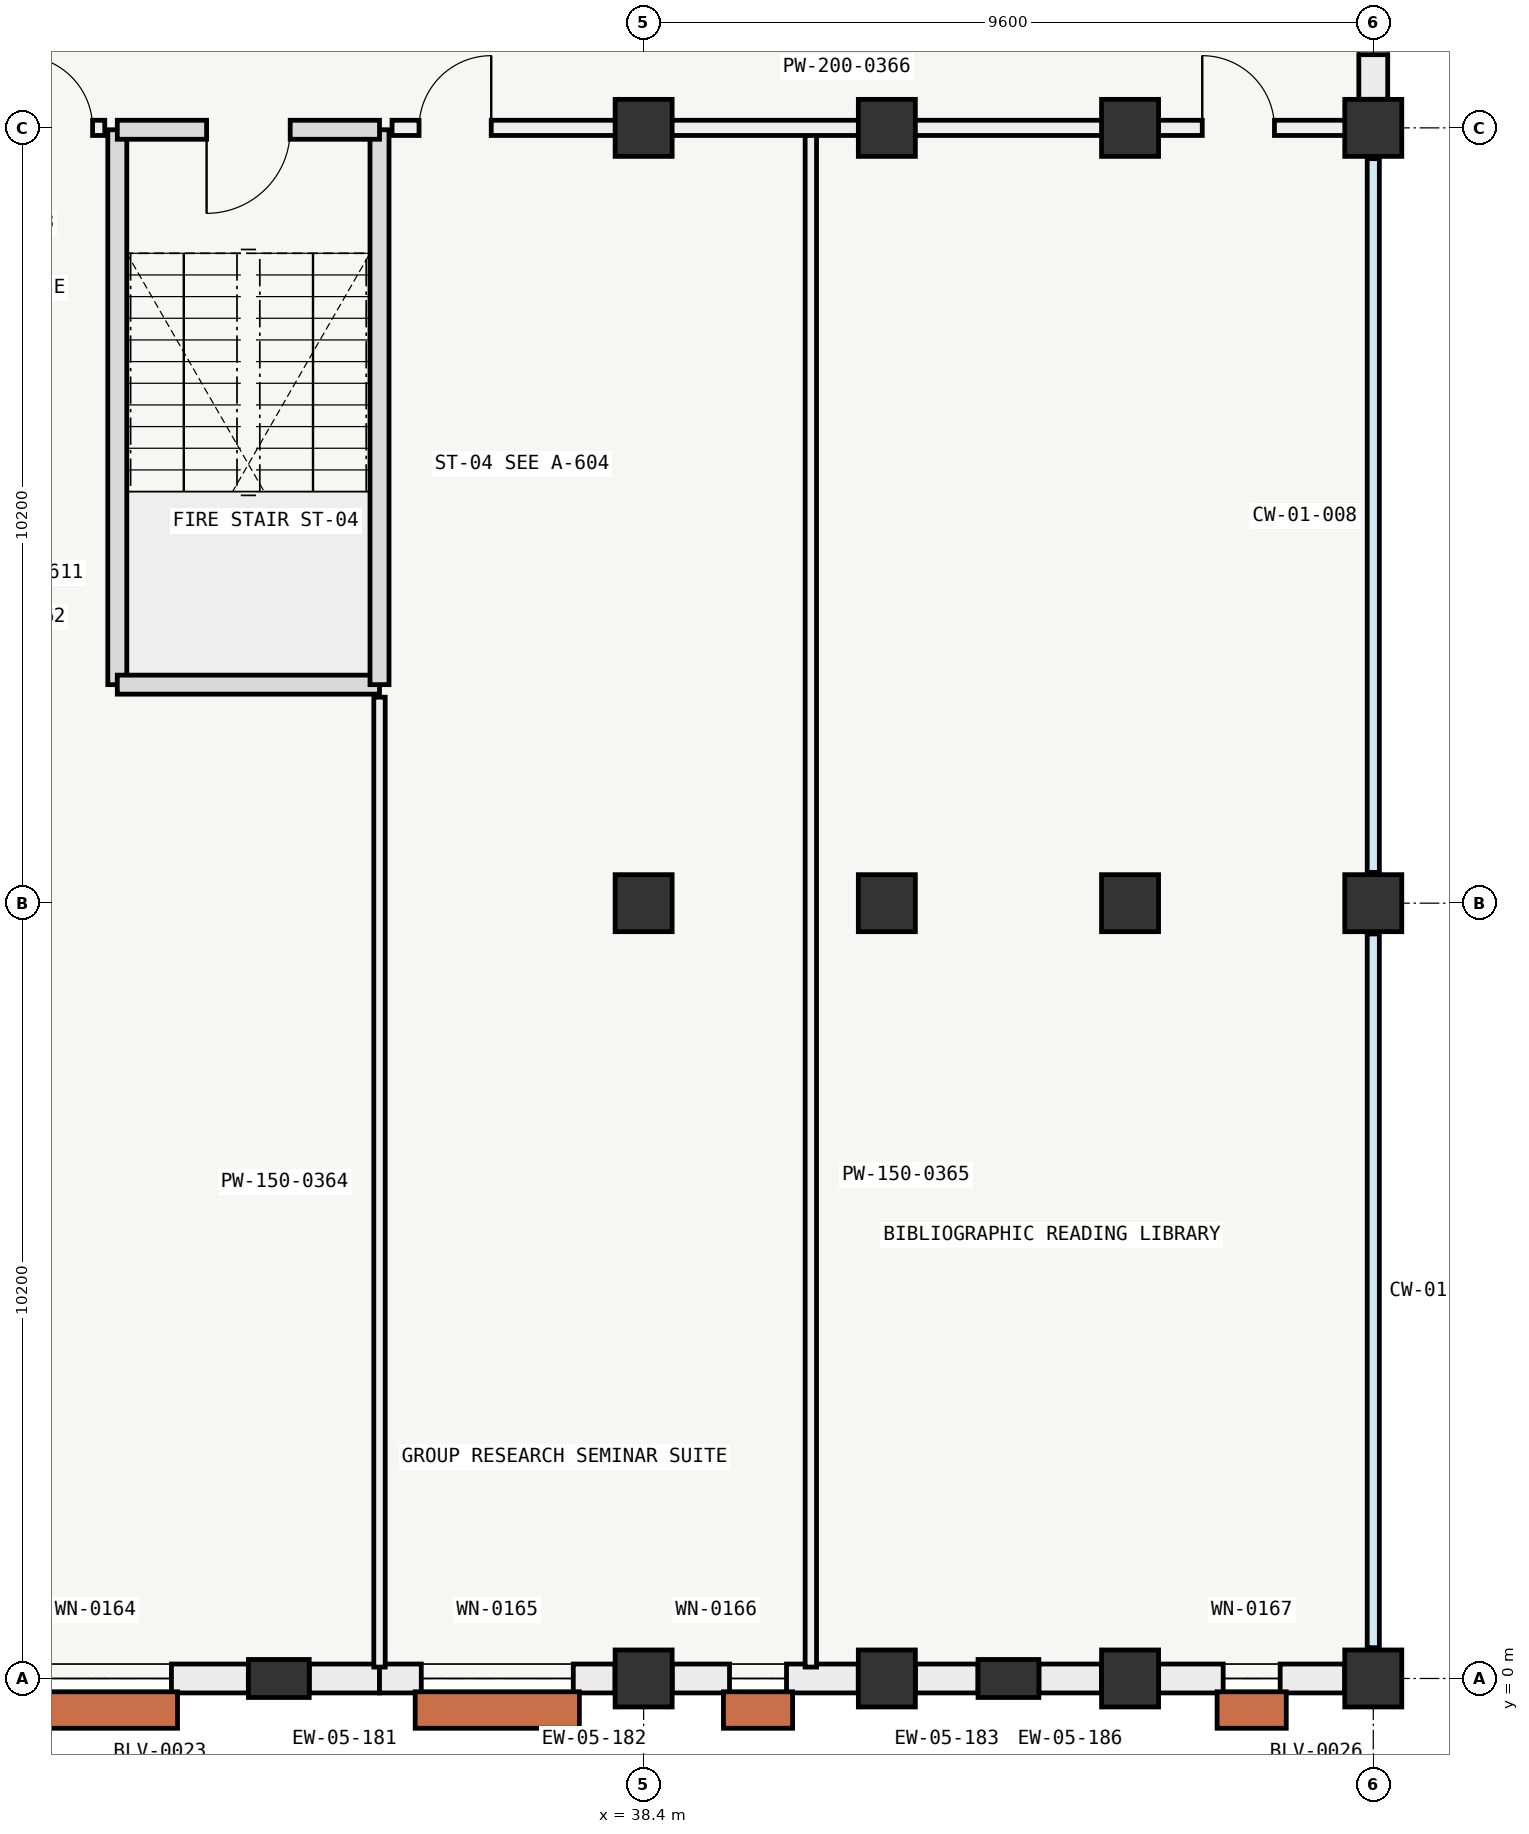
"""IFC4 building model, lengths in metres.
Left out: names, types, materials, properties, quantities, classifications, styles, units other than length and angle.
Written with IfcOpenShell. Run it as: python <this file> out.ifc"""

import sys

from ifc_helpers import new_model, si_unit, direction, frame, frame_2d, origin, origin_2d, place, context, subcontext, project, spatial, rectangle, extrude, element, fill, save


model = new_model("IFC4")
c1 = context("Model", 3, precision=1e-05, world=origin(), true_north=direction((0.0, 1.0)))
c2 = subcontext(c1, "Body", "Model", "MODEL_VIEW")
j1 = project(units=[si_unit("LENGTHUNIT", "METRE"), si_unit("PLANEANGLEUNIT", "RADIAN")], contexts=[c1])
p1 = place(None, origin())
s1 = spatial("IfcSite", under=j1, at=p1, CompositionType="ELEMENT")
p2 = place(p1, origin())
s2 = spatial("IfcBuilding", under=s1, at=p2, CompositionType="ELEMENT")
p3 = place(p2, frame((0.0, 0.0, 5.4)))
s3 = spatial("IfcBuildingStorey", under=s2, at=p3, CompositionType="ELEMENT", Elevation=5.4)
for number, where, z_axis, x_axis in (
    (1, (38.4, 0.0, 0.0), (0.0, 0.0, 1.0), (1.0, 0.0, 0.0)),
    (2, (38.4, 10.2, 0.0), (0.0, 0.0, 1.0), (1.0, 0.0, 0.0)),
    (3, (38.4, 20.4, 0.0), (0.0, 0.0, 1.0), (1.0, 0.0, 0.0)),
    (4, (41.6, 0.0, 0.0), (0.0, 0.0, 1.0), (1.0, 0.0, 0.0)),
    (5, (41.6, 10.2, 0.0), (0.0, 0.0, 1.0), (1.0, 0.0, 0.0)),
    (6, (41.6, 20.4, 0.0), (0.0, 0.0, 1.0), (1.0, 0.0, 0.0)),
    (7, (44.8, 0.0, 0.0), (0.0, 0.0, 1.0), (1.0, 0.0, 0.0)),
    (8, (44.8, 10.2, 0.0), (0.0, 0.0, 1.0), (1.0, 0.0, 0.0)),
    (9, (44.8, 20.4, 0.0), (0.0, 0.0, 1.0), (1.0, 0.0, 0.0)),
    (10, (48.0, 0.0, 0.0), (0.0, 0.0, 1.0), (1.0, 0.0, 0.0)),
    (11, (48.0, 10.2, 0.0), (0.0, 0.0, 1.0), (1.0, 0.0, 0.0)),
    (12, (48.0, 20.4, 0.0), (0.0, 0.0, 1.0), (1.0, 0.0, 0.0)),
):
    element("IfcColumn", number, at=place(p3, frame(where, z_axis=z_axis, x_axis=x_axis)), inside=s3, PredefinedType="COLUMN", context=c2, shape_type="SweptSolid", body=[
        extrude(rectangle(XDim=0.75, YDim=0.75, at=origin_2d()), origin(), (0.0, 0.0, 1.0), 4.2),
    ])
for number, where, z_axis, x_axis in (
    (13, (33.6, 0.0, 0.0), (0.0, 0.0, 1.0), (0.0, 1.0, 0.0)),
    (14, (43.2, 0.0, 0.0), (0.0, 0.0, 1.0), (0.0, 1.0, 0.0)),
):
    element("IfcColumn", number, at=place(p3, frame(where, z_axis=z_axis, x_axis=x_axis)), inside=s3, PredefinedType="PILASTER", context=c2, shape_type="SweptSolid", body=[
        extrude(rectangle(XDim=0.5, YDim=0.8, at=origin_2d()), origin(), (0.0, 0.0, 1.0), 4.2),
    ])
p4 = place(p3, frame((33.199, 0.0, 0.0), z_axis=(0.0, 0.0, 1.0), x_axis=(-1.0, 0.0, 0.0)))
e15 = element("IfcWall", 15, at=p4, inside=s3, PredefinedType="SOLIDWALL", context=c2, shape_type="SweptSolid", body=[
    extrude(rectangle(XDim=4.023, YDim=0.38, at=frame_2d((2.011, 0.0))), origin(), (0.0, 0.0, 1.0), 3.25),
])
p5 = place(p4, frame((1.011, 0.0, 0.8)))
e16 = element("IfcOpeningElement", 16, at=p5, cuts=e15, PredefinedType="OPENING", context=c2, shape_type="SweptSolid", body=[
    extrude(rectangle(XDim=2.0, YDim=1.35, at=frame_2d((1.0, 0.675))), frame((0.0, 0.2, 0.0), z_axis=(0.0, -1.0, 0.0), x_axis=(1.0, 0.0, 0.0)), (0.0, 0.0, 1.0), 0.4),
])
p6 = place(p3, frame((34.925, 0.0, 0.0), z_axis=(0.0, 0.0, 1.0), x_axis=(-1.0, 0.0, 0.0)))
e17 = element("IfcWall", 17, at=p6, inside=s3, PredefinedType="SOLIDWALL", context=c2, shape_type="SweptSolid", body=[
    extrude(rectangle(XDim=0.924, YDim=0.38, at=frame_2d((0.462, 0.0))), origin(), (0.0, 0.0, 1.0), 3.25),
])
p7 = place(p3, frame((38.024, 0.0, 0.0), z_axis=(0.0, 0.0, 1.0), x_axis=(-1.0, 0.0, 0.0)))
e18 = element("IfcWall", 18, at=p7, inside=s3, PredefinedType="SOLIDWALL", context=c2, shape_type="SweptSolid", body=[
    extrude(rectangle(XDim=3.099, YDim=0.38, at=frame_2d((1.549, 0.0))), origin(), (0.0, 0.0, 1.0), 3.25),
])
p8 = place(p7, frame((0.55, 0.0, 0.8)))
e19 = element("IfcOpeningElement", 19, at=p8, cuts=e18, PredefinedType="OPENING", context=c2, shape_type="SweptSolid", body=[
    extrude(rectangle(XDim=2.0, YDim=1.35, at=frame_2d((1.0, 0.675))), frame((0.0, 0.2, 0.0), z_axis=(0.0, -1.0, 0.0), x_axis=(1.0, 0.0, 0.0)), (0.0, 0.0, 1.0), 0.4),
])
p9 = place(p3, frame((42.799, 0.0, 0.0), z_axis=(0.0, 0.0, 1.0), x_axis=(-1.0, 0.0, 0.0)))
e20 = element("IfcWall", 20, at=p9, inside=s3, PredefinedType="SOLIDWALL", context=c2, shape_type="SweptSolid", body=[
    extrude(rectangle(XDim=0.823, YDim=0.38, at=frame_2d((0.412, 0.0))), origin(), (0.0, 0.0, 1.0), 3.25),
])
p10 = place(p3, frame((41.224, 0.0, 0.0), z_axis=(0.0, 0.0, 1.0), x_axis=(-1.0, 0.0, 0.0)))
e21 = element("IfcWall", 21, at=p10, inside=s3, PredefinedType="SOLIDWALL", context=c2, shape_type="SweptSolid", body=[
    extrude(rectangle(XDim=2.448, YDim=0.38, at=frame_2d((1.224, 0.0))), origin(), (0.0, 0.0, 1.0), 3.25),
])
p11 = place(p10, frame((0.944, 0.0, 0.8)))
e22 = element("IfcOpeningElement", 22, at=p11, cuts=e21, PredefinedType="OPENING", context=c2, shape_type="SweptSolid", body=[
    extrude(rectangle(XDim=0.75, YDim=1.1, at=frame_2d((0.375, 0.55))), frame((0.0, 0.2, 0.0), z_axis=(0.0, -1.0, 0.0), x_axis=(1.0, 0.0, 0.0)), (0.0, 0.0, 1.0), 0.4),
])
p12 = place(p3, frame((47.624, 0.0, 0.0), z_axis=(0.0, 0.0, 1.0), x_axis=(-1.0, 0.0, 0.0)))
e23 = element("IfcWall", 23, at=p12, inside=s3, PredefinedType="SOLIDWALL", context=c2, shape_type="SweptSolid", body=[
    extrude(rectangle(XDim=2.448, YDim=0.38, at=frame_2d((1.224, 0.0))), origin(), (0.0, 0.0, 1.0), 3.25),
])
p13 = place(p12, frame((0.849, 0.0, 0.8)))
e24 = element("IfcOpeningElement", 24, at=p13, cuts=e23, PredefinedType="OPENING", context=c2, shape_type="SweptSolid", body=[
    extrude(rectangle(XDim=0.75, YDim=1.1, at=frame_2d((0.375, 0.55))), frame((0.0, 0.2, 0.0), z_axis=(0.0, -1.0, 0.0), x_axis=(1.0, 0.0, 0.0)), (0.0, 0.0, 1.0), 0.4),
])
p14 = place(p3, frame((44.424, 0.0, 0.0), z_axis=(0.0, 0.0, 1.0), x_axis=(-1.0, 0.0, 0.0)))
e25 = element("IfcWall", 25, at=p14, inside=s3, PredefinedType="SOLIDWALL", context=c2, shape_type="SweptSolid", body=[
    extrude(rectangle(XDim=0.823, YDim=0.38, at=frame_2d((0.412, 0.0))), origin(), (0.0, 0.0, 1.0), 3.25),
])
p15 = place(p3, frame((48.0, 23.95, 0.0), z_axis=(0.0, 0.0, 1.0), x_axis=(0.0, -1.0, 0.0)))
e26 = element("IfcWall", 26, at=p15, inside=s3, PredefinedType="SOLIDWALL", context=c2, shape_type="SweptSolid", body=[
    extrude(rectangle(XDim=3.174, YDim=0.38, at=frame_2d((1.587, 0.0))), origin(), (0.0, 0.0, 1.0), 3.25),
])
p16 = place(p15, frame((0.587, 0.0, 0.75)))
e27 = element("IfcOpeningElement", 27, at=p16, cuts=e26, PredefinedType="OPENING", context=c2, shape_type="SweptSolid", body=[
    extrude(rectangle(XDim=2.0, YDim=1.35, at=frame_2d((1.0, 0.675))), frame((0.0, 0.2, 0.0), z_axis=(0.0, -1.0, 0.0), x_axis=(1.0, 0.0, 0.0)), (0.0, 0.0, 1.0), 0.4),
])
p17 = place(p3, frame((31.475, 20.375, 0.0), z_axis=(0.0, 0.0, 1.0), x_axis=(0.0, -1.0, 0.0)))
e28 = element("IfcWall", 28, at=p17, inside=s3, PredefinedType="SOLIDWALL", context=c2, shape_type="SweptSolid", body=[
    extrude(rectangle(XDim=7.3, YDim=0.25, at=frame_2d((3.65, 0.0))), origin(), (0.0, 0.0, 1.0), 3.92),
])
p18 = place(p3, frame((31.475, 13.075, 0.0), z_axis=(0.0, 0.0, 1.0), x_axis=(1.0, 0.0, 0.0)))
e29 = element("IfcWall", 29, at=p18, inside=s3, PredefinedType="SOLIDWALL", context=c2, shape_type="SweptSolid", body=[
    extrude(rectangle(XDim=3.45, YDim=0.25, at=frame_2d((1.725, 0.0))), origin(), (0.0, 0.0, 1.0), 3.92),
])
p19 = place(p3, frame((34.925, 13.075, 0.0), z_axis=(0.0, 0.0, 1.0), x_axis=(0.0, 1.0, 0.0)))
e30 = element("IfcWall", 30, at=p19, inside=s3, PredefinedType="SOLIDWALL", context=c2, shape_type="SweptSolid", body=[
    extrude(rectangle(XDim=7.3, YDim=0.25, at=frame_2d((3.65, 0.0))), origin(), (0.0, 0.0, 1.0), 3.92),
])
p20 = place(p3, frame((34.925, 20.375, 0.0), z_axis=(0.0, 0.0, 1.0), x_axis=(-1.0, 0.0, 0.0)))
e31 = element("IfcWall", 31, at=p20, inside=s3, PredefinedType="SOLIDWALL", context=c2, shape_type="SweptSolid", body=[
    extrude(rectangle(XDim=3.45, YDim=0.25, at=frame_2d((1.725, 0.0))), origin(), (0.0, 0.0, 1.0), 3.92),
])
p21 = place(p20, frame((1.175, 0.0, 0.0)))
e32 = element("IfcOpeningElement", 32, at=p21, cuts=e31, PredefinedType="OPENING", context=c2, shape_type="SweptSolid", body=[
    extrude(rectangle(XDim=1.1, YDim=2.2, at=frame_2d((0.55, 1.1))), frame((0.0, 0.135, 0.0), z_axis=(0.0, -1.0, 0.0), x_axis=(1.0, 0.0, 0.0)), (0.0, 0.0, 1.0), 0.27),
])
p22 = place(p3, frame((28.2, 20.4, 0.0), z_axis=(0.0, 0.0, 1.0), x_axis=(1.0, 0.0, 0.0)))
e33 = element("IfcWall", 33, at=p22, inside=s3, PredefinedType="PARTITIONING", context=c2, shape_type="SweptSolid", body=[
    extrude(rectangle(XDim=3.11, YDim=0.2, at=frame_2d((1.555, 0.0))), origin(), (0.0, 0.0, 1.0), 3.2),
])
p23 = place(p22, frame((2.0, 0.0, 0.0)))
e34 = element("IfcOpeningElement", 34, at=p23, cuts=e33, PredefinedType="OPENING", context=c2, shape_type="SweptSolid", body=[
    extrude(rectangle(XDim=0.95, YDim=2.1, at=frame_2d((0.475, 1.05))), frame((0.0, 0.11, 0.0), z_axis=(0.0, -1.0, 0.0), x_axis=(1.0, 0.0, 0.0)), (0.0, 0.0, 1.0), 0.22),
])
p24 = place(p3, frame((34.925, 0.15, 0.0), z_axis=(0.0, 0.0, 1.0), x_axis=(0.0, 1.0, 0.0)))
e35 = element("IfcWall", 35, at=p24, inside=s3, PredefinedType="PARTITIONING", context=c2, shape_type="SweptSolid", body=[
    extrude(rectangle(XDim=12.76, YDim=0.15, at=frame_2d((6.38, 0.0))), origin(), (0.0, 0.0, 1.0), 3.2),
])
p25 = place(p3, frame((40.6, 0.15, 0.0), z_axis=(0.0, 0.0, 1.0), x_axis=(0.0, 1.0, 0.0)))
e36 = element("IfcWall", 36, at=p25, inside=s3, PredefinedType="PARTITIONING", context=c2, shape_type="SweptSolid", body=[
    extrude(rectangle(XDim=20.25, YDim=0.15, at=frame_2d((10.125, 0.0))), origin(), (0.0, 0.0, 1.0), 3.2),
])
p26 = place(p3, frame((35.09, 20.4, 0.0), z_axis=(0.0, 0.0, 1.0), x_axis=(1.0, 0.0, 0.0)))
e37 = element("IfcWall", 37, at=p26, inside=s3, PredefinedType="PARTITIONING", context=c2, shape_type="SweptSolid", body=[
    extrude(rectangle(XDim=12.76, YDim=0.2, at=frame_2d((6.38, 0.0))), origin(), (0.0, 0.0, 1.0), 3.2),
])
p27 = place(p26, frame((0.355, 0.0, 0.0)))
e38 = element("IfcOpeningElement", 38, at=p27, cuts=e37, PredefinedType="OPENING", context=c2, shape_type="SweptSolid", body=[
    extrude(rectangle(XDim=0.95, YDim=2.1, at=frame_2d((0.475, 1.05))), frame((0.0, 0.11, 0.0), z_axis=(0.0, -1.0, 0.0), x_axis=(1.0, 0.0, 0.0)), (0.0, 0.0, 1.0), 0.22),
])
p28 = place(p26, frame((10.66, 0.0, 0.0)))
e39 = element("IfcOpeningElement", 39, at=p28, cuts=e37, PredefinedType="OPENING", context=c2, shape_type="SweptSolid", body=[
    extrude(rectangle(XDim=0.95, YDim=2.1, at=frame_2d((0.475, 1.05))), frame((0.0, 0.11, 0.0), z_axis=(0.0, -1.0, 0.0), x_axis=(1.0, 0.0, 0.0)), (0.0, 0.0, 1.0), 0.22),
])
p29 = place(p5, origin())
e40 = element("IfcWindow", 40, at=p29, inside=s3, PartitioningType="SINGLE_PANEL", PredefinedType="WINDOW", context=c2, shape_type="SweptSolid", body=[
    extrude(rectangle(XDim=2.0, YDim=1.35, at=frame_2d((1.0, 0.675))), frame((0.0, 0.03, 0.0), z_axis=(0.0, -1.0, 0.0), x_axis=(1.0, 0.0, 0.0)), (0.0, 0.0, 1.0), 0.06),
])
fill(e16, e40)
p30 = place(p8, origin())
e41 = element("IfcWindow", 41, at=p30, inside=s3, PartitioningType="SINGLE_PANEL", PredefinedType="WINDOW", context=c2, shape_type="SweptSolid", body=[
    extrude(rectangle(XDim=2.0, YDim=1.35, at=frame_2d((1.0, 0.675))), frame((0.0, 0.03, 0.0), z_axis=(0.0, -1.0, 0.0), x_axis=(1.0, 0.0, 0.0)), (0.0, 0.0, 1.0), 0.06),
])
fill(e19, e41)
p31 = place(p11, origin())
e42 = element("IfcWindow", 42, at=p31, inside=s3, PartitioningType="SINGLE_PANEL", PredefinedType="WINDOW", context=c2, shape_type="SweptSolid", body=[
    extrude(rectangle(XDim=0.75, YDim=1.1, at=frame_2d((0.375, 0.55))), frame((0.0, 0.03, 0.0), z_axis=(0.0, -1.0, 0.0), x_axis=(1.0, 0.0, 0.0)), (0.0, 0.0, 1.0), 0.06),
])
fill(e22, e42)
p32 = place(p13, origin())
e43 = element("IfcWindow", 43, at=p32, inside=s3, PartitioningType="SINGLE_PANEL", PredefinedType="WINDOW", context=c2, shape_type="SweptSolid", body=[
    extrude(rectangle(XDim=0.75, YDim=1.1, at=frame_2d((0.375, 0.55))), frame((0.0, 0.03, 0.0), z_axis=(0.0, -1.0, 0.0), x_axis=(1.0, 0.0, 0.0)), (0.0, 0.0, 1.0), 0.06),
])
fill(e24, e43)
p33 = place(p16, origin())
e44 = element("IfcWindow", 44, at=p33, inside=s3, PartitioningType="SINGLE_PANEL", PredefinedType="WINDOW", context=c2, shape_type="SweptSolid", body=[
    extrude(rectangle(XDim=2.0, YDim=1.35, at=frame_2d((1.0, 0.675))), frame((0.0, 0.03, 0.0), z_axis=(0.0, -1.0, 0.0), x_axis=(1.0, 0.0, 0.0)), (0.0, 0.0, 1.0), 0.06),
])
fill(e27, e44)
p34 = place(p21, origin())
e45 = element("IfcDoor", 45, at=p34, inside=s3, OperationType="SINGLE_SWING_RIGHT", PredefinedType="DOOR", context=c2, shape_type="SweptSolid", body=[
    extrude(rectangle(XDim=1.1, YDim=2.2, at=frame_2d((0.55, 1.1))), frame((0.0, 0.025, 0.0), z_axis=(0.0, -1.0, 0.0), x_axis=(1.0, 0.0, 0.0)), (0.0, 0.0, 1.0), 0.05),
])
fill(e32, e45)
p35 = place(p23, origin())
e46 = element("IfcDoor", 46, at=p35, inside=s3, OperationType="SINGLE_SWING_LEFT", PredefinedType="DOOR", context=c2, shape_type="SweptSolid", body=[
    extrude(rectangle(XDim=0.95, YDim=2.1, at=frame_2d((0.475, 1.05))), frame((0.0, 0.025, 0.0), z_axis=(0.0, -1.0, 0.0), x_axis=(1.0, 0.0, 0.0)), (0.0, 0.0, 1.0), 0.05),
])
fill(e34, e46)
p36 = place(p27, origin())
e47 = element("IfcDoor", 47, at=p36, inside=s3, OperationType="SINGLE_SWING_RIGHT", PredefinedType="DOOR", context=c2, shape_type="SweptSolid", body=[
    extrude(rectangle(XDim=0.95, YDim=2.1, at=frame_2d((0.475, 1.05))), frame((0.0, 0.025, 0.0), z_axis=(0.0, -1.0, 0.0), x_axis=(1.0, 0.0, 0.0)), (0.0, 0.0, 1.0), 0.05),
])
fill(e38, e47)
p37 = place(p28, origin())
e48 = element("IfcDoor", 48, at=p37, inside=s3, OperationType="SINGLE_SWING_LEFT", PredefinedType="DOOR", context=c2, shape_type="SweptSolid", body=[
    extrude(rectangle(XDim=0.95, YDim=2.1, at=frame_2d((0.475, 1.05))), frame((0.0, 0.025, 0.0), z_axis=(0.0, -1.0, 0.0), x_axis=(1.0, 0.0, 0.0)), (0.0, 0.0, 1.0), 0.05),
])
fill(e39, e48)
save(model, sys.argv[1])
